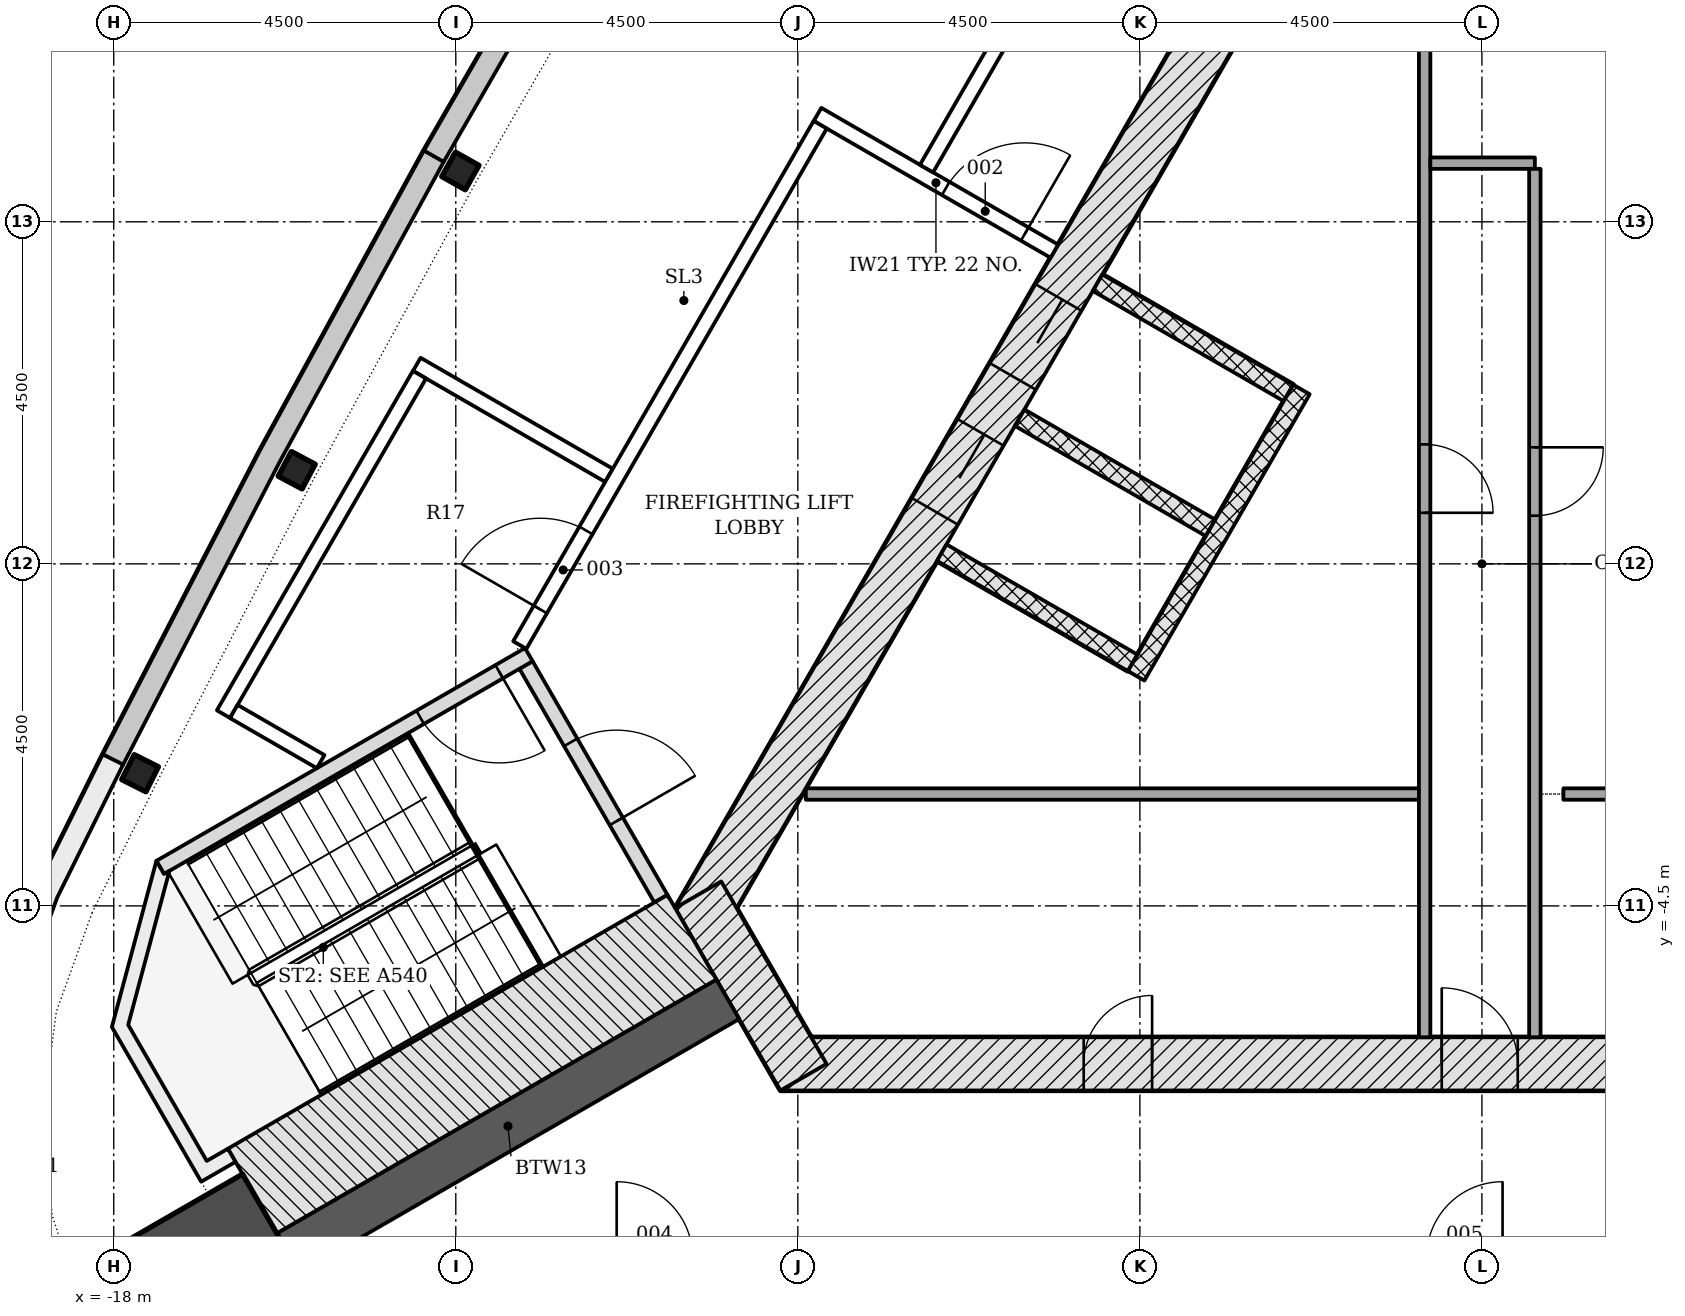
"""IFC4 building model, lengths in metres.
Left out: names, types, materials, properties, quantities, classifications, styles, units other than length and angle.
Written with IfcOpenShell. Run it as: python <this file> out.ifc"""

import sys

from ifc_helpers import new_model, si_unit, direction, frame, frame_2d, origin, origin_2d, place, context, subcontext, project, spatial, polyline, rectangle, i_section, outline, extrude, element, fill, save


model = new_model("IFC4")
c1 = context("Model", 3, precision=1e-05, world=origin(), true_north=direction((0.0, 1.0)))
c2 = subcontext(c1, "Body", "Model", "MODEL_VIEW")
j1 = project(units=[si_unit("LENGTHUNIT", "METRE"), si_unit("PLANEANGLEUNIT", "RADIAN")], contexts=[c1])
p1 = place(None, origin())
s1 = spatial("IfcSite", under=j1, at=p1, CompositionType="ELEMENT")
p2 = place(p1, origin())
s2 = spatial("IfcBuilding", under=s1, at=p2, CompositionType="ELEMENT")
p3 = place(p2, frame((0.0, 0.0, 297.6)))
s3 = spatial("IfcBuildingStorey", under=s2, at=p3, CompositionType="ELEMENT", Elevation=297.6)
p4 = place(p3, frame((-9.229, -6.578, -0.25), z_axis=(0.0, 0.0, 1.0), x_axis=(1.0, 0.0, 0.0)))
e1 = element("IfcWall", 1, at=p4, inside=s3, PredefinedType="SHEAR", context=c2, shape_type="SweptSolid", body=[
    extrude(rectangle(XDim=18.458, YDim=0.7, at=frame_2d((9.229, 0.0))), origin(), (0.0, 0.0, 1.0), 4.5),
])
p5 = place(p4, frame((8.7, 0.0, 0.25)))
e2 = element("IfcOpeningElement", 2, at=p5, cuts=e1, PredefinedType="OPENING", context=c2, shape_type="SweptSolid", body=[
    extrude(rectangle(XDim=1.0, YDim=2.1, at=frame_2d((0.5, 1.05))), frame((0.0, 0.36, 0.0), z_axis=(0.0, -1.0, 0.0), x_axis=(1.0, 0.0, 0.0)), (0.0, 0.0, 1.0), 0.72),
])
p6 = place(p4, frame((3.99, 0.0, 0.25)))
e3 = element("IfcOpeningElement", 3, at=p6, cuts=e1, PredefinedType="OPENING", context=c2, shape_type="SweptSolid", body=[
    extrude(rectangle(XDim=0.9, YDim=2.1, at=frame_2d((0.45, 1.05))), frame((0.0, 0.36, 0.0), z_axis=(0.0, -1.0, 0.0), x_axis=(1.0, 0.0, 0.0)), (0.0, 0.0, 1.0), 0.72),
])
p7 = place(p4, frame((13.539, 0.0, 0.25)))
e4 = element("IfcOpeningElement", 4, at=p7, cuts=e1, PredefinedType="OPENING", context=c2, shape_type="SweptSolid", body=[
    extrude(rectangle(XDim=0.9, YDim=2.1, at=frame_2d((0.45, 1.05))), frame((0.0, 0.36, 0.0), z_axis=(0.0, -1.0, 0.0), x_axis=(1.0, 0.0, 0.0)), (0.0, 0.0, 1.0), 0.72),
])
p8 = place(p3, frame((10.311, -4.703, -0.25), z_axis=(0.0, 0.0, 1.0), x_axis=(-0.500001446645, 0.866024568562, 0.0)))
e5 = element("IfcWall", 5, at=p8, inside=s3, PredefinedType="SHEAR", context=c2, shape_type="SweptSolid", body=[
    extrude(rectangle(XDim=18.458, YDim=0.7, at=frame_2d((9.229, 0.0))), origin(), (0.0, 0.0, 1.0), 4.5),
])
p9 = place(p3, frame((-1.083, 11.281, -0.25), z_axis=(0.0, 0.0, 1.0), x_axis=(-0.500001446645, -0.866024568562, 0.0)))
e6 = element("IfcWall", 6, at=p9, inside=s3, PredefinedType="SHEAR", context=c2, shape_type="SweptSolid", body=[
    extrude(rectangle(XDim=18.458, YDim=0.7, at=frame_2d((9.229, 0.0))), origin(), (0.0, 0.0, 1.0), 4.5),
])
p10 = place(p9, frame((8.979, 0.0, 0.25)))
e7 = element("IfcOpeningElement", 7, at=p10, cuts=e6, PredefinedType="OPENING", context=c2, shape_type="SweptSolid", body=[
    extrude(rectangle(XDim=1.2, YDim=2.1, at=frame_2d((0.6, 1.05))), frame((0.0, 0.36, 0.0), z_axis=(0.0, -1.0, 0.0), x_axis=(1.0, 0.0, 0.0)), (0.0, 0.0, 1.0), 0.72),
])
p11 = place(p9, frame((11.029, 0.0, 0.25)))
e8 = element("IfcOpeningElement", 8, at=p11, cuts=e6, PredefinedType="OPENING", context=c2, shape_type="SweptSolid", body=[
    extrude(rectangle(XDim=1.2, YDim=2.1, at=frame_2d((0.6, 1.05))), frame((0.0, 0.36, 0.0), z_axis=(0.0, -1.0, 0.0), x_axis=(1.0, 0.0, 0.0)), (0.0, 0.0, 1.0), 0.72),
])
p12 = place(p3, frame((-10.311, -4.353, -0.25), z_axis=(0.0, 0.0, 1.0), x_axis=(0.500042739161, -0.866000726912, 0.0)))
e9 = element("IfcWall", 9, at=p12, inside=s3, PredefinedType="SHEAR", context=c2, shape_type="SweptSolid", body=[
    extrude(rectangle(XDim=2.771, YDim=0.7, at=frame_2d((1.386, 0.0))), origin(), (0.0, 0.0, 1.0), 4.5),
])
p13 = place(p3, frame((-9.922, -5.728, -0.25), z_axis=(0.0, 0.0, 1.0), x_axis=(-0.866032176823, -0.499988268569, 0.0)))
e10 = element("IfcWall", 10, at=p13, inside=s3, PredefinedType="SHEAR", context=c2, shape_type="SweptSolid", body=[
    extrude(rectangle(XDim=6.678, YDim=0.6, at=frame_2d((3.339, 0.0))), origin(), (0.0, 0.0, 1.0), 4.5),
])
p14 = place(p3, frame((-16.745, -9.667, -0.25), z_axis=(0.0, 0.0, 1.0), x_axis=(-0.866025403784, -0.5, 0.0)))
e11 = element("IfcColumn", 11, at=p14, inside=s3, PredefinedType="COLUMN", context=c2, shape_type="SweptSolid", body=[
    extrude(rectangle(XDim=2.4, YDim=2.4, at=origin_2d()), origin(), (0.0, 0.0, 1.0), 4.5),
])
for number, where, z_axis, x_axis in (
    (12, (-13.44, 5.169, -0.25), (0.0, 0.0, 1.0), (-0.49, -0.872, 0.0)),
    (13, (-15.593, 1.232, -0.25), (0.0, 0.0, 1.0), (-0.47, -0.883, 0.0)),
    (14, (-17.654, -2.754, -0.25), (0.0, 0.0, 1.0), (-0.449, -0.894, 0.0)),
):
    element("IfcColumn", number, at=place(p3, frame(where, z_axis=z_axis, x_axis=x_axis)), inside=s3, PredefinedType="COLUMN", context=c2, shape_type="SweptSolid", body=[
        extrude(i_section(OverallWidth=0.368, OverallDepth=0.356, WebThickness=0.011, FlangeThickness=0.018, FilletRadius=0.015, at=origin_2d()), origin(), (0.0, 0.0, 1.0), 4.5),
    ])
p15 = place(p3, origin())
e15 = element("IfcWall", 15, at=p15, inside=s3, PredefinedType="NOTDEFINED", context=c2, shape_type="SweptSolid", body=[
    extrude(outline(polyline([(-13.919, 5.438), (-16.078, 1.49), (-18.145, -2.507), (-17.878, -2.645), (-15.813, 1.349), (-13.656, 5.294), (-13.919, 5.438)])), origin(), (0.0, 0.0, 1.0), 4.25),
])
p16 = place(p3, origin())
e16 = element("IfcWall", 16, at=p16, inside=s3, PredefinedType="NOTDEFINED", context=c2, shape_type="SweptSolid", body=[
    extrude(outline(polyline([(-11.669, 9.335), (-13.919, 5.438), (-13.659, 5.288), (-11.409, 9.185), (-11.669, 9.335)])), origin(), (0.0, 0.0, 1.0), 1.2),
])
p17 = place(p3, origin())
e17 = element("IfcWall", 17, at=p17, inside=s3, PredefinedType="NOTDEFINED", context=c2, shape_type="SweptSolid", body=[
    extrude(outline(polyline([(-18.145, -2.507), (-19.021, -4.273), (-19.538, -5.703), (-19.733, -7.21), (-19.599, -8.724), (-19.141, -10.174), (-18.381, -11.49), (-17.355, -12.611), (-16.111, -13.485), (-14.708, -14.069), (-13.211, -14.336), (-11.244, -14.46), (-11.225, -14.161), (-13.176, -14.038), (-14.623, -13.779), (-15.965, -13.22), (-17.156, -12.385), (-18.138, -11.312), (-18.865, -10.052), (-19.303, -8.665), (-19.432, -7.216), (-19.244, -5.774), (-18.745, -4.391), (-17.876, -2.64), (-18.145, -2.507)])), origin(), (0.0, 0.0, 1.0), 4.25),
])
for number, where, z_axis, x_axis in (
    (18, (-5.056, 3.699, -0.25), (0.0, 0.0, 1.0), (0.866, -0.5, 0.0)),
    (19, (-6.081, 1.923, -0.25), (0.0, 0.0, 1.0), (0.866, -0.5, 0.0)),
    (20, (-7.106, 0.148, -0.25), (0.0, 0.0, 1.0), (0.866, -0.5, 0.0)),
):
    element("IfcWall", number, at=place(p3, frame(where, z_axis=z_axis, x_axis=x_axis)), inside=s3, PredefinedType="PARTITIONING", context=c2, shape_type="SweptSolid", body=[
        extrude(rectangle(XDim=2.9, YDim=0.25, at=frame_2d((1.45, 0.0))), origin(), (0.0, 0.0, 1.0), 4.5),
    ])
p18 = place(p3, frame((-2.374, 2.294, 0.0), z_axis=(0.0, 0.0, 1.0), x_axis=(-0.499996127374, -0.866027639635, 0.0)))
e21 = element("IfcWall", 21, at=p18, inside=s3, PredefinedType="PARTITIONING", context=c2, shape_type="SweptSolid", body=[
    extrude(rectangle(XDim=4.35, YDim=0.25, at=frame_2d((2.175, 0.0))), origin(), (0.0, 0.0, 1.0), 4.25),
])
p19 = place(p3, frame((-8.895, -3.028, 0.0), z_axis=(0.0, 0.0, 1.0), x_axis=(1.0, 0.0, 0.0)))
e22 = element("IfcWall", 22, at=p19, inside=s3, PredefinedType="PARTITIONING", context=c2, shape_type="SweptSolid", body=[
    extrude(rectangle(XDim=8.066, YDim=0.15, at=frame_2d((4.033, 0.0))), origin(), (0.0, 0.0, 1.0), 4.25),
])
p20 = place(p3, frame((-0.754, 10.756, 0.0), z_axis=(0.0, 0.0, 1.0), x_axis=(0.0, -1.0, 0.0)))
e23 = element("IfcWall", 23, at=p20, inside=s3, PredefinedType="PARTITIONING", context=c2, shape_type="SweptSolid", body=[
    extrude(rectangle(XDim=16.985, YDim=0.15, at=frame_2d((8.492, 0.0))), origin(), (0.0, 0.0, 1.0), 4.25),
])
p21 = place(p20, frame((9.185, 0.0, 0.0)))
e24 = element("IfcOpeningElement", 24, at=p21, cuts=e23, PredefinedType="OPENING", context=c2, shape_type="SweptSolid", body=[
    extrude(rectangle(XDim=0.9, YDim=2.1, at=frame_2d((0.45, 1.05))), frame((0.0, 0.085, 0.0), z_axis=(0.0, -1.0, 0.0), x_axis=(1.0, 0.0, 0.0)), (0.0, 0.0, 1.0), 0.17),
])
p22 = place(p3, frame((-0.679, 5.272, 0.0), z_axis=(0.0, 0.0, 1.0), x_axis=(1.0, 0.0, 0.0)))
e25 = element("IfcWall", 25, at=p22, inside=s3, PredefinedType="PARTITIONING", context=c2, shape_type="SweptSolid", body=[
    extrude(rectangle(XDim=1.375, YDim=0.15, at=frame_2d((0.688, 0.0))), origin(), (0.0, 0.0, 1.0), 4.25),
])
p23 = place(p3, frame((0.696, 5.197, 0.0), z_axis=(0.0, 0.0, 1.0), x_axis=(0.0, -1.0, 0.0)))
e26 = element("IfcWall", 26, at=p23, inside=s3, PredefinedType="PARTITIONING", context=c2, shape_type="SweptSolid", body=[
    extrude(rectangle(XDim=11.425, YDim=0.15, at=frame_2d((5.712, 0.0))), origin(), (0.0, 0.0, 1.0), 4.25),
])
p24 = place(p23, frame((3.664, 0.0, 0.0)))
e27 = element("IfcOpeningElement", 27, at=p24, cuts=e26, PredefinedType="OPENING", context=c2, shape_type="SweptSolid", body=[
    extrude(rectangle(XDim=0.9, YDim=2.1, at=frame_2d((0.45, 1.05))), frame((0.0, 0.085, 0.0), z_axis=(0.0, -1.0, 0.0), x_axis=(1.0, 0.0, 0.0)), (0.0, 0.0, 1.0), 0.17),
])
p25 = place(p3, frame((1.071, -3.028, 0.0), z_axis=(0.0, 0.0, 1.0), x_axis=(1.0, 0.0, 0.0)))
e28 = element("IfcWall", 28, at=p25, inside=s3, PredefinedType="PARTITIONING", context=c2, shape_type="SweptSolid", body=[
    extrude(rectangle(XDim=7.824, YDim=0.15, at=frame_2d((3.912, 0.0))), origin(), (0.0, 0.0, 1.0), 4.25),
])
p26 = place(p3, frame((-12.576, -1.331, -0.25), z_axis=(0.0, 0.0, 1.0), x_axis=(0.499970499736, -0.8660424351, 0.0)))
e29 = element("IfcWall", 29, at=p26, inside=s3, PredefinedType="SHEAR", context=c2, shape_type="SweptSolid", body=[
    extrude(rectangle(XDim=3.55, YDim=0.2, at=frame_2d((1.775, 0.0))), origin(), (0.0, 0.0, 1.0), 4.5),
])
p27 = place(p26, frame((1.175, 0.0, 0.25)))
e30 = element("IfcOpeningElement", 30, at=p27, cuts=e29, PredefinedType="OPENING", context=c2, shape_type="SweptSolid", body=[
    extrude(rectangle(XDim=1.2, YDim=2.1, at=frame_2d((0.6, 1.05))), frame((0.0, 0.11, 0.0), z_axis=(0.0, -1.0, 0.0), x_axis=(1.0, 0.0, 0.0)), (0.0, 0.0, 1.0), 0.22),
])
p28 = place(p3, frame((-12.539, -1.194, -0.25), z_axis=(0.0, 0.0, 1.0), x_axis=(-0.866045472092, -0.499965239061, 0.0)))
e31 = element("IfcWall", 31, at=p28, inside=s3, PredefinedType="SHEAR", context=c2, shape_type="SweptSolid", body=[
    extrude(rectangle(XDim=5.6, YDim=0.2, at=frame_2d((2.8, 0.0))), origin(), (0.0, 0.0, 1.0), 4.5),
])
p29 = place(p28, frame((0.45, 0.0, 0.25)))
e32 = element("IfcOpeningElement", 32, at=p29, cuts=e31, PredefinedType="OPENING", context=c2, shape_type="SweptSolid", body=[
    extrude(rectangle(XDim=1.2, YDim=2.1, at=frame_2d((0.6, 1.05))), frame((0.0, 0.11, 0.0), z_axis=(0.0, -1.0, 0.0), x_axis=(1.0, 0.0, 0.0)), (0.0, 0.0, 1.0), 0.22),
])
p30 = place(p3, frame((-10.393, -4.912, -0.25), z_axis=(0.0, 0.0, 1.0), x_axis=(-0.866025486527, -0.499999856685, 0.0)))
e33 = element("IfcWall", 33, at=p30, inside=s3, PredefinedType="SHEAR", context=c2, shape_type="SweptSolid", body=[
    extrude(rectangle(XDim=6.679, YDim=1.286, at=frame_2d((3.339, 0.0))), origin(), (0.0, 0.0, 1.0), 4.5),
])
p31 = place(p3, frame((0.0, 0.0, -0.25)))
e34 = element("IfcWall", 34, at=p31, inside=s3, PredefinedType="SHEAR", context=c2, shape_type="SweptSolid", body=[
    extrude(outline(polyline([(-17.439, -3.907), (-18.025, -6.093), (-16.85, -8.128), (-16.398, -7.867), (-16.498, -7.694), (-16.498, -7.694), (-16.777, -7.855), (-17.81, -6.065), (-17.267, -4.039), (-17.339, -4.081), (-17.339, -4.081), (-17.339, -4.081), (-17.339, -4.081), (-17.339, -4.081), (-17.339, -4.081), (-17.339, -4.081), (-17.339, -4.081), (-17.339, -4.081), (-17.339, -4.081), (-17.339, -4.081), (-17.339, -4.081), (-17.339, -4.081), (-17.339, -4.081), (-17.339, -4.081), (-17.339, -4.081), (-17.339, -4.081), (-17.439, -3.907)])), origin(), (0.0, 0.0, 1.0), 4.5),
])
p32 = place(p3, frame((-8.741, 5.913, 0.0), z_axis=(0.0, 0.0, 1.0), x_axis=(0.866017220491, -0.500014173611, 0.0)))
e35 = element("IfcWall", 35, at=p32, inside=s3, PredefinedType="PARTITIONING", context=c2, shape_type="SweptSolid", body=[
    extrude(rectangle(XDim=3.598, YDim=0.2, at=frame_2d((1.799, 0.0))), origin(), (0.0, 0.0, 1.0), 4.25),
])
p33 = place(p32, frame((1.948, 0.0, 0.0)))
e36 = element("IfcOpeningElement", 36, at=p33, cuts=e35, PredefinedType="OPENING", context=c2, shape_type="SweptSolid", body=[
    extrude(rectangle(XDim=1.2, YDim=2.1, at=frame_2d((0.6, 1.05))), frame((0.0, 0.11, 0.0), z_axis=(0.0, -1.0, 0.0), x_axis=(1.0, 0.0, 0.0)), (0.0, 0.0, 1.0), 0.22),
])
p34 = place(p3, frame((-14.013, 2.625, 0.0), z_axis=(0.0, 0.0, 1.0), x_axis=(0.866026830048, -0.499997529631, 0.0)))
e37 = element("IfcWall", 37, at=p34, inside=s3, PredefinedType="PARTITIONING", context=c2, shape_type="SweptSolid", body=[
    extrude(rectangle(XDim=2.919, YDim=0.2, at=frame_2d((1.46, 0.0))), origin(), (0.0, 0.0, 1.0), 4.25),
])
p35 = place(p3, frame((-12.658, -1.068, 0.0), z_axis=(0.0, 0.0, 1.0), x_axis=(0.499996073327, 0.866027670838, 0.0)))
e38 = element("IfcWall", 38, at=p35, inside=s3, PredefinedType="PARTITIONING", context=c2, shape_type="SweptSolid", body=[
    extrude(rectangle(XDim=7.904, YDim=0.2, at=frame_2d((3.952, 0.0))), origin(), (0.0, 0.0, 1.0), 3.702),
])
p36 = place(p35, frame((0.541, 0.0, 0.0)))
e39 = element("IfcOpeningElement", 39, at=p36, cuts=e38, PredefinedType="OPENING", context=c2, shape_type="SweptSolid", body=[
    extrude(rectangle(XDim=1.2, YDim=2.1, at=frame_2d((0.6, 1.05))), frame((0.0, 0.11, 0.0), z_axis=(0.0, -1.0, 0.0), x_axis=(1.0, 0.0, 0.0)), (0.0, 0.0, 1.0), 0.22),
])
p37 = place(p3, frame((-7.307, 5.2, 0.0), z_axis=(0.0, 0.0, 1.0), x_axis=(0.49999780173, 0.866026672953, 0.0)))
e40 = element("IfcWall", 40, at=p37, inside=s3, PredefinedType="PARTITIONING", context=c2, shape_type="SweptSolid", body=[
    extrude(rectangle(XDim=13.841, YDim=0.2, at=frame_2d((6.92, 0.0))), origin(), (0.0, 0.0, 1.0), 3.702),
])
p38 = place(p37, frame((6.454, 0.0, 0.0)))
e41 = element("IfcOpeningElement", 41, at=p38, cuts=e40, PredefinedType="OPENING", context=c2, shape_type="SweptSolid", body=[
    extrude(rectangle(XDim=1.0, YDim=2.1, at=frame_2d((0.5, 1.05))), frame((0.0, 0.11, 0.0), z_axis=(0.0, -1.0, 0.0), x_axis=(1.0, 0.0, 0.0)), (0.0, 0.0, 1.0), 0.22),
])
p39 = place(p3, frame((-13.978, 2.489, 0.0), z_axis=(0.0, 0.0, 1.0), x_axis=(-0.499983365876, -0.866035007288, 0.0)))
e42 = element("IfcWall", 42, at=p39, inside=s3, PredefinedType="PARTITIONING", context=c2, shape_type="SweptSolid", body=[
    extrude(rectangle(XDim=5.157, YDim=0.2, at=frame_2d((2.579, 0.0))), origin(), (0.0, 0.0, 1.0), 3.702),
])
p40 = place(p3, frame((-16.421, -1.942, 0.0), z_axis=(0.0, 0.0, 1.0), x_axis=(0.865991484893, -0.500058744641, 0.0)))
e43 = element("IfcWall", 43, at=p40, inside=s3, PredefinedType="PARTITIONING", context=c2, shape_type="SweptSolid", body=[
    extrude(rectangle(XDim=1.32, YDim=0.2, at=frame_2d((0.66, 0.0))), origin(), (0.0, 0.0, 1.0), 4.25),
])
p41 = place(p10, origin())
e44 = element("IfcDoor", 44, at=p41, inside=s3, OperationType="DOUBLE_DOOR_SLIDING", PredefinedType="DOOR", context=c2, shape_type="SweptSolid", body=[
    extrude(rectangle(XDim=1.2, YDim=2.1, at=frame_2d((0.6, 1.05))), frame((0.0, 0.025, 0.0), z_axis=(0.0, -1.0, 0.0), x_axis=(1.0, 0.0, 0.0)), (0.0, 0.0, 1.0), 0.05),
])
fill(e7, e44)
p42 = place(p11, origin())
e45 = element("IfcDoor", 45, at=p42, inside=s3, OperationType="DOUBLE_DOOR_SLIDING", PredefinedType="DOOR", context=c2, shape_type="SweptSolid", body=[
    extrude(rectangle(XDim=1.2, YDim=2.1, at=frame_2d((0.6, 1.05))), frame((0.0, 0.025, 0.0), z_axis=(0.0, -1.0, 0.0), x_axis=(1.0, 0.0, 0.0)), (0.0, 0.0, 1.0), 0.05),
])
fill(e8, e45)
p43 = place(p5, origin())
e46 = element("IfcDoor", 46, at=p43, inside=s3, OperationType="SINGLE_SWING_LEFT", PredefinedType="DOOR", context=c2, shape_type="SweptSolid", body=[
    extrude(rectangle(XDim=1.0, YDim=2.1, at=frame_2d((0.5, 1.05))), frame((0.0, 0.075, 0.0), z_axis=(0.0, -1.0, 0.0), x_axis=(1.0, 0.0, 0.0)), (0.0, 0.0, 1.0), 0.15),
])
fill(e2, e46)
p44 = place(p6, origin())
e47 = element("IfcDoor", 47, at=p44, inside=s3, OperationType="SINGLE_SWING_RIGHT", PredefinedType="DOOR", context=c2, shape_type="SweptSolid", body=[
    extrude(rectangle(XDim=0.9, YDim=2.1, at=frame_2d((0.45, 1.05))), frame((0.0, 0.075, 0.0), z_axis=(0.0, -1.0, 0.0), x_axis=(1.0, 0.0, 0.0)), (0.0, 0.0, 1.0), 0.15),
])
fill(e3, e47)
p45 = place(p21, origin())
e48 = element("IfcDoor", 48, at=p45, inside=s3, OperationType="SINGLE_SWING_RIGHT", PredefinedType="DOOR", context=c2, shape_type="SweptSolid", body=[
    extrude(rectangle(XDim=0.9, YDim=2.1, at=frame_2d((0.45, 1.05))), frame((0.0, 0.025, 0.0), z_axis=(0.0, -1.0, 0.0), x_axis=(1.0, 0.0, 0.0)), (0.0, 0.0, 1.0), 0.05),
])
fill(e24, e48)
p46 = place(p24, origin())
e49 = element("IfcDoor", 49, at=p46, inside=s3, OperationType="SINGLE_SWING_LEFT", PredefinedType="DOOR", context=c2, shape_type="SweptSolid", body=[
    extrude(rectangle(XDim=0.9, YDim=2.1, at=frame_2d((0.45, 1.05))), frame((0.0, 0.025, 0.0), z_axis=(0.0, -1.0, 0.0), x_axis=(1.0, 0.0, 0.0)), (0.0, 0.0, 1.0), 0.05),
])
fill(e27, e49)
p47 = place(p27, origin())
e50 = element("IfcDoor", 50, at=p47, inside=s3, OperationType="SINGLE_SWING_RIGHT", PredefinedType="DOOR", context=c2, shape_type="SweptSolid", body=[
    extrude(rectangle(XDim=1.2, YDim=2.1, at=frame_2d((0.6, 1.05))), frame((0.0, 0.025, 0.0), z_axis=(0.0, -1.0, 0.0), x_axis=(1.0, 0.0, 0.0)), (0.0, 0.0, 1.0), 0.05),
])
fill(e30, e50)
p48 = place(p29, origin())
e51 = element("IfcDoor", 51, at=p48, inside=s3, OperationType="SINGLE_SWING_LEFT", PredefinedType="DOOR", context=c2, shape_type="SweptSolid", body=[
    extrude(rectangle(XDim=1.2, YDim=2.1, at=frame_2d((0.6, 1.05))), frame((0.0, 0.025, 0.0), z_axis=(0.0, -1.0, 0.0), x_axis=(1.0, 0.0, 0.0)), (0.0, 0.0, 1.0), 0.05),
])
fill(e32, e51)
p49 = place(p33, origin())
e52 = element("IfcDoor", 52, at=p49, inside=s3, OperationType="SINGLE_SWING_RIGHT", PredefinedType="DOOR", context=c2, shape_type="SweptSolid", body=[
    extrude(rectangle(XDim=1.2, YDim=2.1, at=frame_2d((0.6, 1.05))), frame((0.0, 0.025, 0.0), z_axis=(0.0, -1.0, 0.0), x_axis=(1.0, 0.0, 0.0)), (0.0, 0.0, 1.0), 0.05),
])
fill(e36, e52)
p50 = place(p36, origin())
e53 = element("IfcDoor", 53, at=p50, inside=s3, OperationType="SINGLE_SWING_LEFT", PredefinedType="DOOR", context=c2, shape_type="SweptSolid", body=[
    extrude(rectangle(XDim=1.2, YDim=2.1, at=frame_2d((0.6, 1.05))), frame((0.0, 0.025, 0.0), z_axis=(0.0, -1.0, 0.0), x_axis=(1.0, 0.0, 0.0)), (0.0, 0.0, 1.0), 0.05),
])
fill(e39, e53)
save(model, sys.argv[1])
